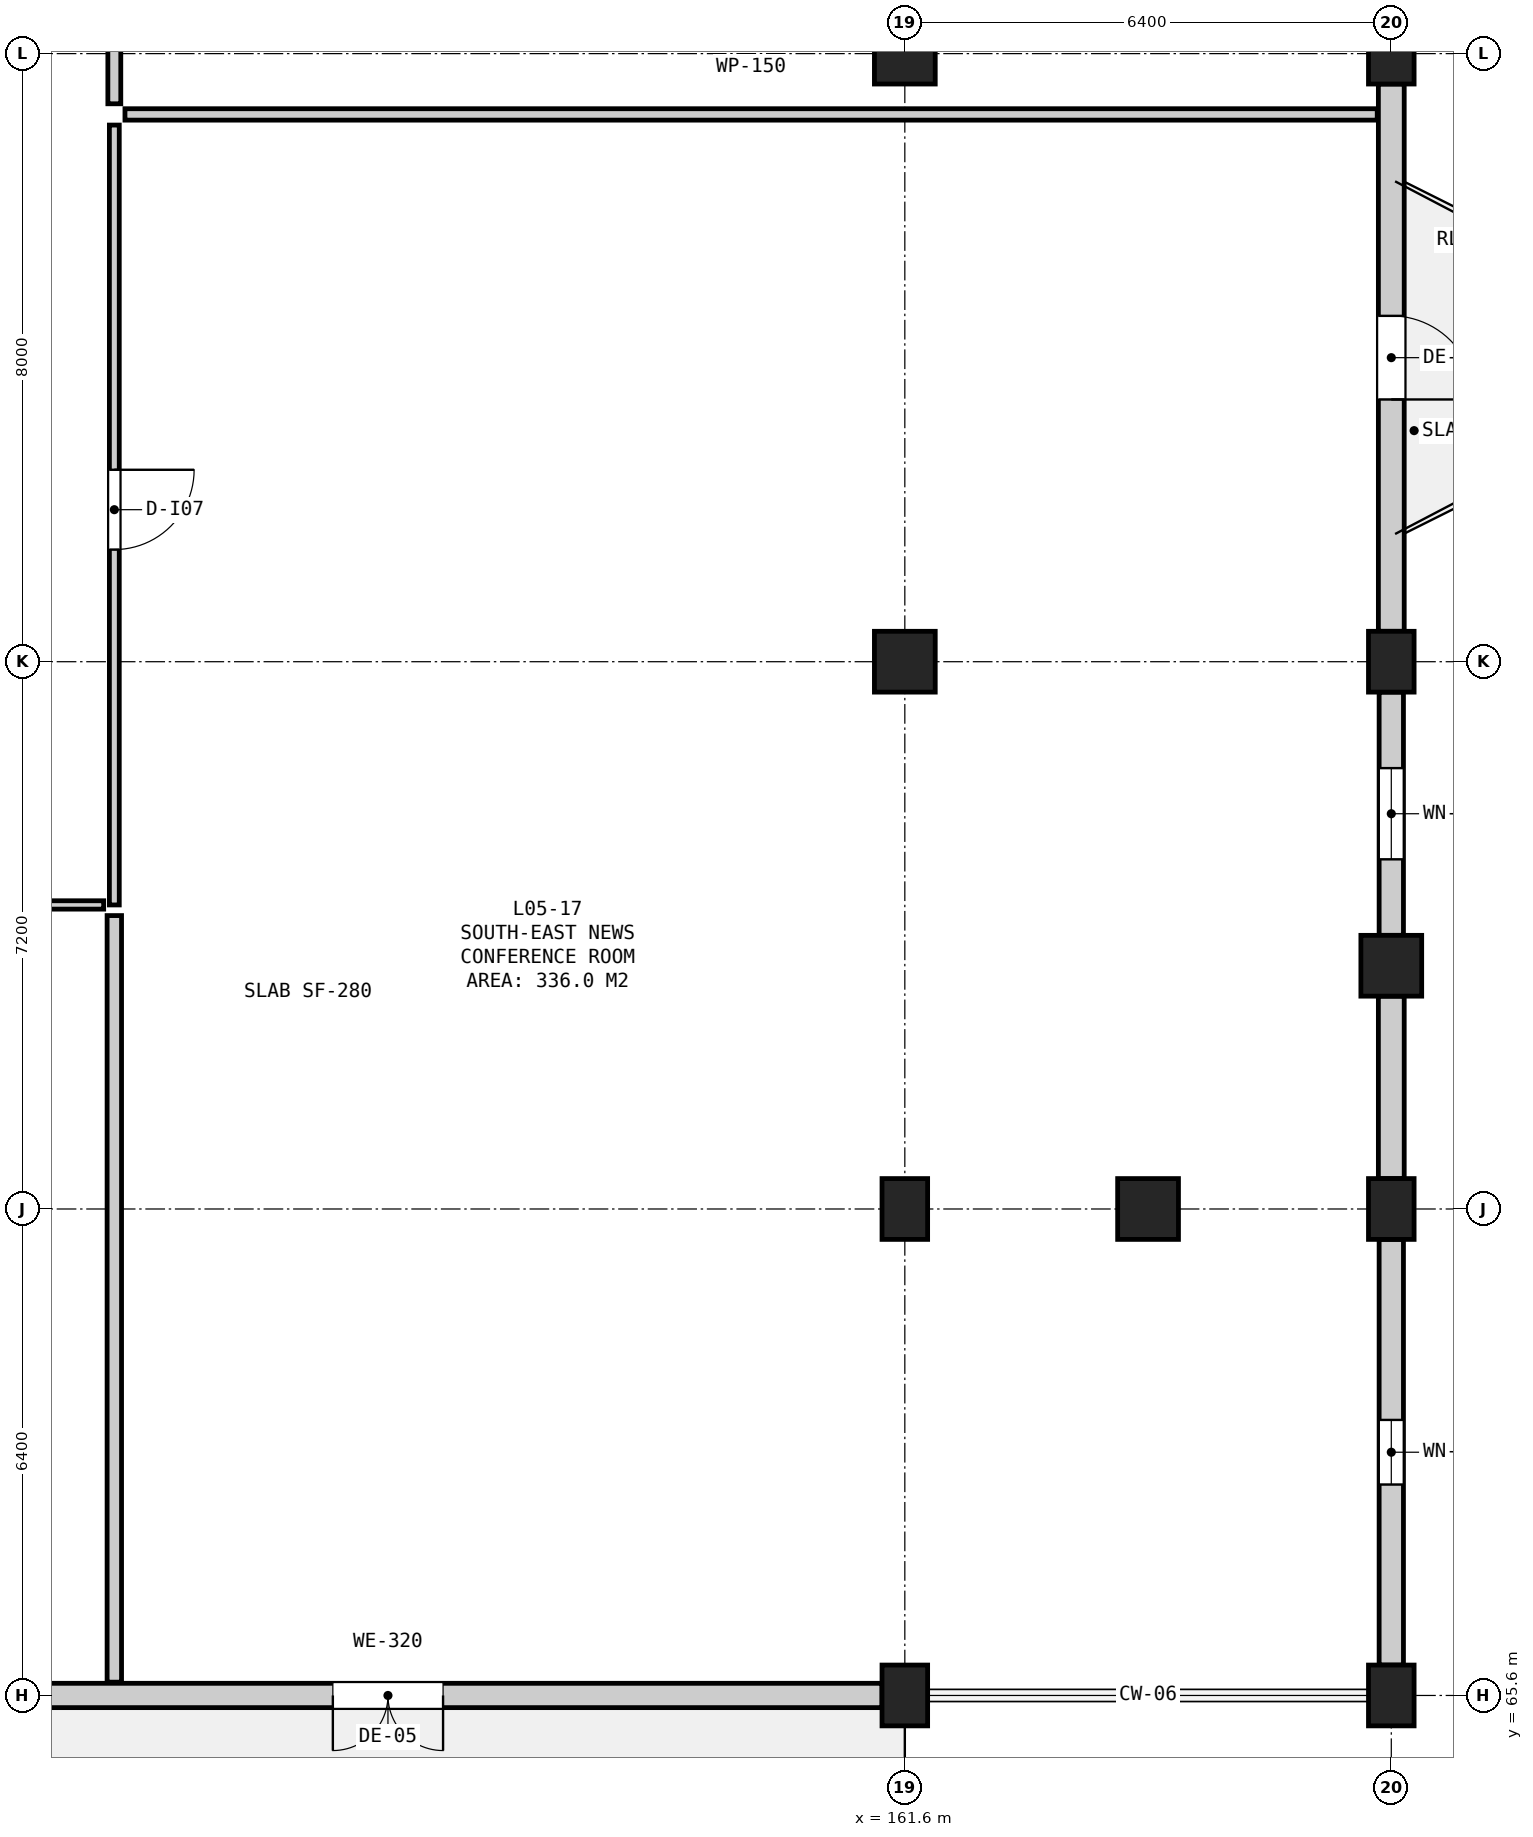
"""IFC4 building model, lengths in metres.
Left out: names, types, materials, properties, quantities, classifications, styles, units other than length and angle.
Written with IfcOpenShell. Run it as: python <this file> out.ifc"""

import sys

from ifc_helpers import new_model, si_unit, direction, frame, frame_2d, origin, origin_2d, place, context, subcontext, project, spatial, rectangle, circle, extrude, element, fill, save


model = new_model("IFC4")
c1 = context("Model", 3, precision=1e-05, world=origin(), true_north=direction((0.0, 1.0)))
c2 = subcontext(c1, "Body", "Model", "MODEL_VIEW")
j1 = project(units=[si_unit("LENGTHUNIT", "METRE"), si_unit("PLANEANGLEUNIT", "RADIAN")], contexts=[c1])
p1 = place(None, origin())
s1 = spatial("IfcSite", under=j1, at=p1, CompositionType="ELEMENT")
p2 = place(p1, origin())
s2 = spatial("IfcBuilding", under=s1, at=p2, CompositionType="ELEMENT")
p3 = place(p2, frame((0.0, 0.0, 23.8)))
s3 = spatial("IfcBuildingStorey", under=s2, at=p3, CompositionType="ELEMENT", Elevation=23.8)
for number, where, z_axis, x_axis in (
    (1, (161.6, 65.6, 0.0), (0.0, 0.0, 1.0), (1.0, 0.0, 0.0)),
    (2, (161.6, 72.0, 0.0), (0.0, 0.0, 1.0), (1.0, 0.0, 0.0)),
):
    element("IfcColumn", number, at=place(p3, frame(where, z_axis=z_axis, x_axis=x_axis)), inside=s3, PredefinedType="COLUMN", context=c2, shape_type="SweptSolid", body=[
        extrude(rectangle(XDim=0.6, YDim=0.8, at=origin_2d()), origin(), (0.0, 0.0, 1.0), 4.0),
    ])
for number, where, z_axis, x_axis in (
    (3, (161.6, 79.2, 0.0), (0.0, 0.0, 1.0), (1.0, 0.0, 0.0)),
    (4, (161.6, 87.2, 0.0), (0.0, 0.0, 1.0), (1.0, 0.0, 0.0)),
):
    element("IfcColumn", number, at=place(p3, frame(where, z_axis=z_axis, x_axis=x_axis)), inside=s3, PredefinedType="COLUMN", context=c2, shape_type="SweptSolid", body=[
        extrude(rectangle(XDim=0.8, YDim=0.8, at=origin_2d()), origin(), (0.0, 0.0, 1.0), 4.0),
    ])
p4 = place(p3, frame((164.8, 72.0, 0.0), z_axis=(0.0, 0.0, 1.0), x_axis=(1.0, 0.0, 0.0)))
e5 = element("IfcColumn", 5, at=p4, inside=s3, PredefinedType="COLUMN", context=c2, shape_type="SweptSolid", body=[
    extrude(circle(Radius=0.4, at=origin_2d()), origin(), (0.0, 0.0, 1.0), 4.0),
])
for number, where, z_axis, x_axis in (
    (6, (168.0, 65.6, 0.0), (0.0, 0.0, 1.0), (1.0, 0.0, 0.0)),
    (7, (168.0, 72.0, 0.0), (0.0, 0.0, 1.0), (1.0, 0.0, 0.0)),
):
    element("IfcColumn", number, at=place(p3, frame(where, z_axis=z_axis, x_axis=x_axis)), inside=s3, PredefinedType="COLUMN", context=c2, shape_type="SweptSolid", body=[
        extrude(rectangle(XDim=0.6, YDim=0.8, at=origin_2d()), origin(), (0.0, 0.0, 1.0), 4.0),
    ])
p5 = place(p3, frame((168.0, 75.2, 0.0), z_axis=(0.0, 0.0, 1.0), x_axis=(1.0, 0.0, 0.0)))
e8 = element("IfcColumn", 8, at=p5, inside=s3, PredefinedType="COLUMN", context=c2, shape_type="SweptSolid", body=[
    extrude(circle(Radius=0.4, at=origin_2d()), origin(), (0.0, 0.0, 1.0), 4.0),
])
for number, where, z_axis, x_axis in (
    (9, (168.0, 79.2, 0.0), (0.0, 0.0, 1.0), (1.0, 0.0, 0.0)),
    (10, (168.0, 87.2, 0.0), (0.0, 0.0, 1.0), (1.0, 0.0, 0.0)),
):
    element("IfcColumn", number, at=place(p3, frame(where, z_axis=z_axis, x_axis=x_axis)), inside=s3, PredefinedType="COLUMN", context=c2, shape_type="SweptSolid", body=[
        extrude(rectangle(XDim=0.6, YDim=0.8, at=origin_2d()), origin(), (0.0, 0.0, 1.0), 4.0),
    ])
p6 = place(p3, frame((148.3, 65.6, 0.0), z_axis=(0.0, 0.0, 1.0), x_axis=(1.0, 0.0, 0.0)))
e11 = element("IfcWall", 11, at=p6, inside=s3, PredefinedType="SOLIDWALL", context=c2, shape_type="SweptSolid", body=[
    extrude(rectangle(XDim=13.0, YDim=0.32, at=frame_2d((6.5, 0.0))), origin(), (0.0, 0.0, 1.0), 2.685),
])
p7 = place(p6, frame((5.775, 0.0, 0.0)))
e12 = element("IfcOpeningElement", 12, at=p7, cuts=e11, PredefinedType="OPENING", context=c2, shape_type="SweptSolid", body=[
    extrude(rectangle(XDim=1.45, YDim=2.2, at=frame_2d((0.725, 1.1))), frame((0.0, 0.172, 0.0), z_axis=(0.0, -1.0, 0.0), x_axis=(1.0, 0.0, 0.0)), (0.0, 0.0, 1.0), 0.344),
])
p8 = place(p3, frame((168.0, 66.0, 0.0), z_axis=(0.0, 0.0, 1.0), x_axis=(0.0, 1.0, 0.0)))
e13 = element("IfcWall", 13, at=p8, inside=s3, PredefinedType="SOLIDWALL", context=c2, shape_type="SweptSolid", body=[
    extrude(rectangle(XDim=5.6, YDim=0.32, at=frame_2d((2.8, 0.0))), origin(), (0.0, 0.0, 1.0), 3.085),
])
p9 = place(p8, frame((2.375, 0.0, 0.9)))
e14 = element("IfcOpeningElement", 14, at=p9, cuts=e13, PredefinedType="OPENING", context=c2, shape_type="SweptSolid", body=[
    extrude(rectangle(XDim=0.85, YDim=1.35, at=frame_2d((0.425, 0.675))), frame((0.0, 0.172, 0.0), z_axis=(0.0, -1.0, 0.0), x_axis=(1.0, 0.0, 0.0)), (0.0, 0.0, 1.0), 0.344),
])
p10 = place(p3, frame((168.0, 72.4, 0.0), z_axis=(0.0, 0.0, 1.0), x_axis=(0.0, 1.0, 0.0)))
e15 = element("IfcWall", 15, at=p10, inside=s3, PredefinedType="SOLIDWALL", context=c2, shape_type="SweptSolid", body=[
    extrude(rectangle(XDim=2.4, YDim=0.34, at=frame_2d((1.2, 0.0))), origin(), (0.0, 0.0, 1.0), 3.1),
])
p11 = place(p3, frame((168.0, 75.6, 0.0), z_axis=(0.0, 0.0, 1.0), x_axis=(0.0, 1.0, 0.0)))
e16 = element("IfcWall", 16, at=p11, inside=s3, PredefinedType="SOLIDWALL", context=c2, shape_type="SweptSolid", body=[
    extrude(rectangle(XDim=3.2, YDim=0.32, at=frame_2d((1.6, 0.0))), origin(), (0.0, 0.0, 1.0), 3.1),
])
p12 = place(p11, frame((1.0, 0.0, 0.9)))
e17 = element("IfcOpeningElement", 17, at=p12, cuts=e16, PredefinedType="OPENING", context=c2, shape_type="SweptSolid", body=[
    extrude(rectangle(XDim=1.2, YDim=1.7, at=frame_2d((0.6, 0.85))), frame((0.0, 0.172, 0.0), z_axis=(0.0, -1.0, 0.0), x_axis=(1.0, 0.0, 0.0)), (0.0, 0.0, 1.0), 0.344),
])
p13 = place(p3, frame((168.0, 79.6, 0.0), z_axis=(0.0, 0.0, 1.0), x_axis=(0.0, 1.0, 0.0)))
e18 = element("IfcWall", 18, at=p13, inside=s3, PredefinedType="SOLIDWALL", context=c2, shape_type="SweptSolid", body=[
    extrude(rectangle(XDim=7.2, YDim=0.34, at=frame_2d((3.6, 0.0))), origin(), (0.0, 0.0, 1.0), 3.1),
])
p14 = place(p13, frame((3.05, 0.0, 0.0)))
e19 = element("IfcOpeningElement", 19, at=p14, cuts=e18, PredefinedType="OPENING", context=c2, shape_type="SweptSolid", body=[
    extrude(rectangle(XDim=1.1, YDim=2.2, at=frame_2d((0.55, 1.1))), frame((0.0, 0.182, 0.0), z_axis=(0.0, -1.0, 0.0), x_axis=(1.0, 0.0, 0.0)), (0.0, 0.0, 1.0), 0.364),
])
p15 = place(p3, frame((120.94, 76.0, 0.0), z_axis=(0.0, 0.0, 1.0), x_axis=(1.0, 0.0, 0.0)))
e20 = element("IfcWall", 20, at=p15, inside=s3, PredefinedType="PARTITIONING", context=c2, shape_type="SweptSolid", body=[
    extrude(rectangle(XDim=30.12, YDim=0.11, at=frame_2d((15.06, 0.0))), origin(), (0.0, 0.0, 1.0), 3.72),
])
p16 = place(p15, frame((14.535, 0.0, 0.0)))
e21 = element("IfcOpeningElement", 21, at=p16, cuts=e20, PredefinedType="OPENING", context=c2, shape_type="SweptSolid", body=[
    extrude(rectangle(XDim=1.05, YDim=2.15, at=frame_2d((0.525, 1.075))), frame((0.0, 0.067, 0.0), z_axis=(0.0, -1.0, 0.0), x_axis=(1.0, 0.0, 0.0)), (0.0, 0.0, 1.0), 0.134),
])
p17 = place(p3, frame((151.2, 65.775, 0.0), z_axis=(0.0, 0.0, 1.0), x_axis=(0.0, 1.0, 0.0)))
e22 = element("IfcWall", 22, at=p17, inside=s3, PredefinedType="PARTITIONING", context=c2, shape_type="SweptSolid", body=[
    extrude(rectangle(XDim=10.085, YDim=0.19, at=frame_2d((5.042, 0.0))), origin(), (0.0, 0.0, 1.0), 3.72),
])
p18 = place(p3, frame((151.34, 86.4, 0.0), z_axis=(0.0, 0.0, 1.0), x_axis=(1.0, 0.0, 0.0)))
e23 = element("IfcWall", 23, at=p18, inside=s3, PredefinedType="PARTITIONING", context=c2, shape_type="SweptSolid", body=[
    extrude(rectangle(XDim=16.475, YDim=0.15, at=frame_2d((8.237, 0.0))), origin(), (0.0, 0.0, 1.0), 3.72),
])
p19 = place(p3, frame((151.2, 76.0, 0.0), z_axis=(0.0, 0.0, 1.0), x_axis=(0.0, 1.0, 0.0)))
e24 = element("IfcWall", 24, at=p19, inside=s3, PredefinedType="PARTITIONING", context=c2, shape_type="SweptSolid", body=[
    extrude(rectangle(XDim=10.26, YDim=0.13, at=frame_2d((5.13, 0.0))), origin(), (0.0, 0.0, 1.0), 3.72),
])
p20 = place(p19, frame((4.675, 0.0, 0.0)))
e25 = element("IfcOpeningElement", 25, at=p20, cuts=e24, PredefinedType="OPENING", context=c2, shape_type="SweptSolid", body=[
    extrude(rectangle(XDim=1.05, YDim=2.15, at=frame_2d((0.525, 1.075))), frame((0.0, 0.077, 0.0), z_axis=(0.0, -1.0, 0.0), x_axis=(1.0, 0.0, 0.0)), (0.0, 0.0, 1.0), 0.154),
])
p21 = place(p3, frame((151.2, 86.54, 0.0), z_axis=(0.0, 0.0, 1.0), x_axis=(0.0, 1.0, 0.0)))
e26 = element("IfcWall", 26, at=p21, inside=s3, PredefinedType="PARTITIONING", context=c2, shape_type="SweptSolid", body=[
    extrude(rectangle(XDim=11.72, YDim=0.17, at=frame_2d((5.86, 0.0))), origin(), (0.0, 0.0, 1.0), 3.72),
])
p22 = place(p21, frame((4.435, 0.0, 0.0)))
e27 = element("IfcOpeningElement", 27, at=p22, cuts=e26, PredefinedType="OPENING", context=c2, shape_type="SweptSolid", body=[
    extrude(rectangle(XDim=1.05, YDim=2.15, at=frame_2d((0.525, 1.075))), frame((0.0, 0.097, 0.0), z_axis=(0.0, -1.0, 0.0), x_axis=(1.0, 0.0, 0.0)), (0.0, 0.0, 1.0), 0.194),
])
p23 = place(p7, frame((1.45, 0.0, 0.0), z_axis=(0.0, 0.0, 1.0), x_axis=(-1.0, 0.0, 0.0)))
e28 = element("IfcDoor", 28, at=p23, inside=s3, OperationType="DOUBLE_DOOR_SINGLE_SWING", PredefinedType="DOOR", context=c2, shape_type="SweptSolid", body=[
    extrude(rectangle(XDim=1.45, YDim=2.2, at=frame_2d((0.725, 1.1))), frame((0.0, 0.025, 0.0), z_axis=(0.0, -1.0, 0.0), x_axis=(1.0, 0.0, 0.0)), (0.0, 0.0, 1.0), 0.05),
])
fill(e12, e28)
p24 = place(p9, origin())
e29 = element("IfcWindow", 29, at=p24, inside=s3, PartitioningType="SINGLE_PANEL", PredefinedType="WINDOW", context=c2, shape_type="SweptSolid", body=[
    extrude(rectangle(XDim=0.85, YDim=1.35, at=frame_2d((0.425, 0.675))), frame((0.0, 0.03, 0.0), z_axis=(0.0, -1.0, 0.0), x_axis=(1.0, 0.0, 0.0)), (0.0, 0.0, 1.0), 0.06),
])
fill(e14, e29)
p25 = place(p12, origin())
e30 = element("IfcWindow", 30, at=p25, inside=s3, PartitioningType="SINGLE_PANEL", PredefinedType="WINDOW", context=c2, shape_type="SweptSolid", body=[
    extrude(rectangle(XDim=1.2, YDim=1.7, at=frame_2d((0.6, 0.85))), frame((0.0, 0.03, 0.0), z_axis=(0.0, -1.0, 0.0), x_axis=(1.0, 0.0, 0.0)), (0.0, 0.0, 1.0), 0.06),
])
fill(e17, e30)
p26 = place(p14, frame((1.1, 0.0, 0.0), z_axis=(0.0, 0.0, 1.0), x_axis=(-1.0, 0.0, 0.0)))
e31 = element("IfcDoor", 31, at=p26, inside=s3, OperationType="SINGLE_SWING_RIGHT", PredefinedType="DOOR", context=c2, shape_type="SweptSolid", body=[
    extrude(rectangle(XDim=1.1, YDim=2.2, at=frame_2d((0.55, 1.1))), frame((0.0, 0.025, 0.0), z_axis=(0.0, -1.0, 0.0), x_axis=(1.0, 0.0, 0.0)), (0.0, 0.0, 1.0), 0.05),
])
fill(e19, e31)
p27 = place(p20, frame((1.05, 0.0, 0.0), z_axis=(0.0, 0.0, 1.0), x_axis=(-1.0, 0.0, 0.0)))
e32 = element("IfcDoor", 32, at=p27, inside=s3, OperationType="SINGLE_SWING_LEFT", PredefinedType="DOOR", context=c2, shape_type="SweptSolid", body=[
    extrude(rectangle(XDim=1.05, YDim=2.15, at=frame_2d((0.525, 1.075))), frame((0.0, 0.025, 0.0), z_axis=(0.0, -1.0, 0.0), x_axis=(1.0, 0.0, 0.0)), (0.0, 0.0, 1.0), 0.05),
])
fill(e25, e32)
save(model, sys.argv[1])
